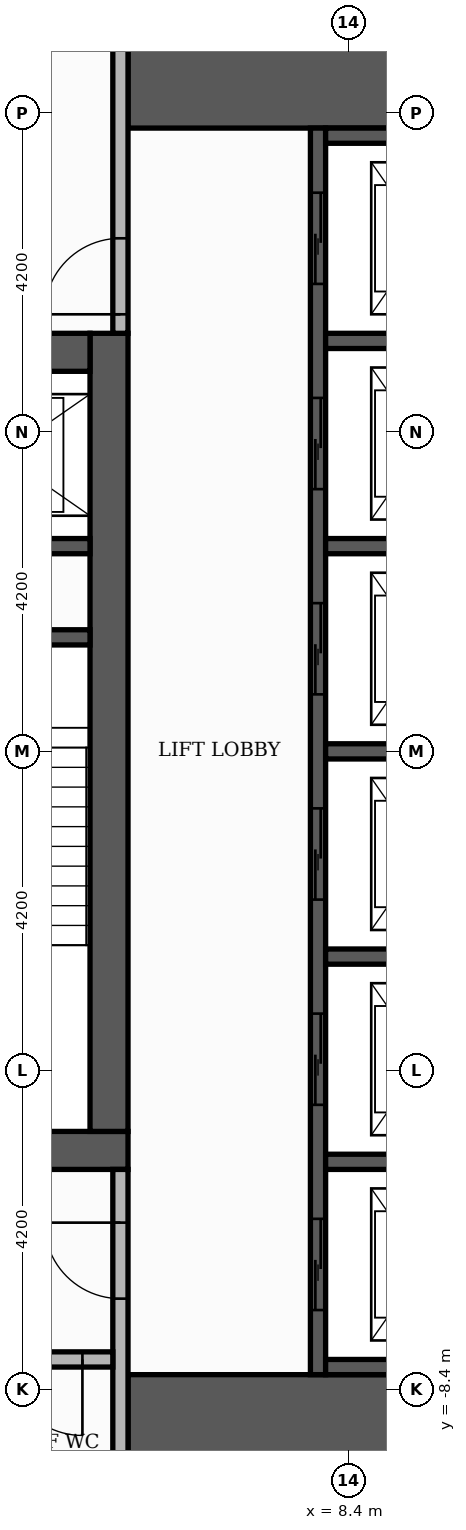
"""IFC4 building model, lengths in metres.
Left out: names, types, materials, properties, quantities, classifications, styles, units other than length and angle.
Written with IfcOpenShell. Run it as: python <this file> out.ifc"""

import sys

from ifc_helpers import new_model, si_unit, direction, frame, frame_2d, origin, place, context, subcontext, project, spatial, rectangle, extrude, element, fill, save


model = new_model("IFC4")
c1 = context("Model", 3, precision=1e-05, world=origin(), true_north=direction((0.0, 1.0)))
c2 = subcontext(c1, "Body", "Model", "MODEL_VIEW")
j1 = project(units=[si_unit("LENGTHUNIT", "METRE"), si_unit("PLANEANGLEUNIT", "RADIAN")], contexts=[c1])
p1 = place(None, origin())
s1 = spatial("IfcSite", under=j1, at=p1, CompositionType="ELEMENT")
p2 = place(p1, origin())
s2 = spatial("IfcBuilding", under=s1, at=p2, CompositionType="ELEMENT")
p3 = place(p2, frame((0.0, 0.0, 165.0)))
s3 = spatial("IfcBuildingStorey", under=s2, at=p3, CompositionType="ELEMENT", Elevation=165.0)
p4 = place(p3, frame((-5.5, -5.25, 0.0), z_axis=(0.0, 0.0, 1.0), x_axis=(1.0, 0.0, 0.0)))
e1 = element("IfcWall", 1, at=p4, inside=s3, PredefinedType="SHEAR", context=c2, shape_type="SweptSolid", body=[
    extrude(rectangle(XDim=11.0, YDim=0.5, at=frame_2d((5.5, 0.0))), origin(), (0.0, 0.0, 1.0), 3.48),
])
p5 = place(p4, frame((4.9, 0.0, 0.0)))
e2 = element("IfcOpeningElement", 2, at=p5, cuts=e1, PredefinedType="OPENING", context=c2, shape_type="SweptSolid", body=[
    extrude(rectangle(XDim=1.2, YDim=2.1, at=frame_2d((0.6, 1.05))), frame((0.0, 0.26, 0.0), z_axis=(0.0, -1.0, 0.0), x_axis=(1.0, 0.0, 0.0)), (0.0, 0.0, 1.0), 0.52),
])
p6 = place(p3, frame((5.25, -5.0, 0.0), z_axis=(0.0, 0.0, 1.0), x_axis=(0.0, 1.0, 0.0)))
e3 = element("IfcWall", 3, at=p6, inside=s3, PredefinedType="SHEAR", context=c2, shape_type="SweptSolid", body=[
    extrude(rectangle(XDim=10.5, YDim=0.5, at=frame_2d((5.25, 0.0))), origin(), (0.0, 0.0, 1.0), 3.48),
])
p7 = place(p3, frame((-5.0, 5.25, 0.0), z_axis=(0.0, 0.0, 1.0), x_axis=(1.0, 0.0, 0.0)))
e4 = element("IfcWall", 4, at=p7, inside=s3, PredefinedType="SHEAR", context=c2, shape_type="SweptSolid", body=[
    extrude(rectangle(XDim=10.0, YDim=0.5, at=frame_2d((5.0, 0.0))), origin(), (0.0, 0.0, 1.0), 3.48),
])
p8 = place(p7, frame((4.4, 0.0, 0.0)))
e5 = element("IfcOpeningElement", 5, at=p8, cuts=e4, PredefinedType="OPENING", context=c2, shape_type="SweptSolid", body=[
    extrude(rectangle(XDim=1.2, YDim=2.1, at=frame_2d((0.6, 1.05))), frame((0.0, 0.26, 0.0), z_axis=(0.0, -1.0, 0.0), x_axis=(1.0, 0.0, 0.0)), (0.0, 0.0, 1.0), 0.52),
])
for number, where, z_axis, x_axis in (
    (6, (5.5, -9.15, 0.0), (0.0, 0.0, 1.0), (1.0, 0.0, 0.0)),
    (7, (5.5, 9.15, 0.0), (0.0, 0.0, 1.0), (1.0, 0.0, 0.0)),
):
    element("IfcWall", number, at=place(p3, frame(where, z_axis=z_axis, x_axis=x_axis)), inside=s3, PredefinedType="SHEAR", context=c2, shape_type="SweptSolid", body=[
        extrude(rectangle(XDim=4.6, YDim=1.9, at=frame_2d((2.3, 0.0))), origin(), (0.0, 0.0, 1.0), 3.48),
    ])
p9 = place(p3, frame((2.15, 1.5, 0.0), z_axis=(0.0, 0.0, 1.0), x_axis=(1.0, 0.0, 0.0)))
e8 = element("IfcWall", 8, at=p9, inside=s3, PredefinedType="SHEAR", context=c2, shape_type="SweptSolid", body=[
    extrude(rectangle(XDim=2.85, YDim=0.2, at=frame_2d((1.425, 0.0))), origin(), (0.0, 0.0, 1.0), 3.48),
])
p10 = place(p3, frame((8.0, -8.2, 0.0), z_axis=(0.0, 0.0, 1.0), x_axis=(0.0, 1.0, 0.0)))
e9 = element("IfcWall", 9, at=p10, inside=s3, PredefinedType="SHEAR", context=c2, shape_type="SweptSolid", body=[
    extrude(rectangle(XDim=16.4, YDim=0.2, at=frame_2d((8.2, 0.0))), origin(), (0.0, 0.0, 1.0), 3.48),
])
p11 = place(p10, frame((0.85, 0.0, 0.0)))
e10 = element("IfcOpeningElement", 10, at=p11, cuts=e9, PredefinedType="OPENING", context=c2, shape_type="SweptSolid", body=[
    extrude(rectangle(XDim=1.2, YDim=2.1, at=frame_2d((0.6, 1.05))), frame((0.0, 0.11, 0.0), z_axis=(0.0, -1.0, 0.0), x_axis=(1.0, 0.0, 0.0)), (0.0, 0.0, 1.0), 0.22),
])
p12 = place(p10, frame((3.55, 0.0, 0.0)))
e11 = element("IfcOpeningElement", 11, at=p12, cuts=e9, PredefinedType="OPENING", context=c2, shape_type="SweptSolid", body=[
    extrude(rectangle(XDim=1.2, YDim=2.1, at=frame_2d((0.6, 1.05))), frame((0.0, 0.11, 0.0), z_axis=(0.0, -1.0, 0.0), x_axis=(1.0, 0.0, 0.0)), (0.0, 0.0, 1.0), 0.22),
])
p13 = place(p10, frame((6.25, 0.0, 0.0)))
e12 = element("IfcOpeningElement", 12, at=p13, cuts=e9, PredefinedType="OPENING", context=c2, shape_type="SweptSolid", body=[
    extrude(rectangle(XDim=1.2, YDim=2.1, at=frame_2d((0.6, 1.05))), frame((0.0, 0.11, 0.0), z_axis=(0.0, -1.0, 0.0), x_axis=(1.0, 0.0, 0.0)), (0.0, 0.0, 1.0), 0.22),
])
p14 = place(p10, frame((8.95, 0.0, 0.0)))
e13 = element("IfcOpeningElement", 13, at=p14, cuts=e9, PredefinedType="OPENING", context=c2, shape_type="SweptSolid", body=[
    extrude(rectangle(XDim=1.2, YDim=2.1, at=frame_2d((0.6, 1.05))), frame((0.0, 0.11, 0.0), z_axis=(0.0, -1.0, 0.0), x_axis=(1.0, 0.0, 0.0)), (0.0, 0.0, 1.0), 0.22),
])
p15 = place(p10, frame((11.65, 0.0, 0.0)))
e14 = element("IfcOpeningElement", 14, at=p15, cuts=e9, PredefinedType="OPENING", context=c2, shape_type="SweptSolid", body=[
    extrude(rectangle(XDim=1.2, YDim=2.1, at=frame_2d((0.6, 1.05))), frame((0.0, 0.11, 0.0), z_axis=(0.0, -1.0, 0.0), x_axis=(1.0, 0.0, 0.0)), (0.0, 0.0, 1.0), 0.22),
])
p16 = place(p10, frame((14.35, 0.0, 0.0)))
e15 = element("IfcOpeningElement", 15, at=p16, cuts=e9, PredefinedType="OPENING", context=c2, shape_type="SweptSolid", body=[
    extrude(rectangle(XDim=1.2, YDim=2.1, at=frame_2d((0.6, 1.05))), frame((0.0, 0.11, 0.0), z_axis=(0.0, -1.0, 0.0), x_axis=(1.0, 0.0, 0.0)), (0.0, 0.0, 1.0), 0.22),
])
for number, where, z_axis, x_axis in (
    (16, (8.1, -8.1, 0.0), (0.0, 0.0, 1.0), (1.0, 0.0, 0.0)),
    (17, (8.1, -5.4, 0.0), (0.0, 0.0, 1.0), (1.0, 0.0, 0.0)),
    (18, (8.1, -2.7, 0.0), (0.0, 0.0, 1.0), (1.0, 0.0, 0.0)),
    (19, (8.1, 0.0, 0.0), (0.0, 0.0, 1.0), (1.0, 0.0, 0.0)),
):
    element("IfcWall", number, at=place(p3, frame(where, z_axis=z_axis, x_axis=x_axis)), inside=s3, PredefinedType="SHEAR", context=c2, shape_type="SweptSolid", body=[
        extrude(rectangle(XDim=2.0, YDim=0.2, at=frame_2d((1.0, 0.0))), origin(), (0.0, 0.0, 1.0), 3.48),
    ])
p17 = place(p3, frame((2.15, 2.7, 0.0), z_axis=(0.0, 0.0, 1.0), x_axis=(1.0, 0.0, 0.0)))
e20 = element("IfcWall", 20, at=p17, inside=s3, PredefinedType="SHEAR", context=c2, shape_type="SweptSolid", body=[
    extrude(rectangle(XDim=2.85, YDim=0.2, at=frame_2d((1.425, 0.0))), origin(), (0.0, 0.0, 1.0), 3.48),
])
for number, where, z_axis, x_axis in (
    (21, (8.1, 2.7, 0.0), (0.0, 0.0, 1.0), (1.0, 0.0, 0.0)),
    (22, (8.1, 5.4, 0.0), (0.0, 0.0, 1.0), (1.0, 0.0, 0.0)),
    (23, (8.1, 8.1, 0.0), (0.0, 0.0, 1.0), (1.0, 0.0, 0.0)),
):
    element("IfcWall", number, at=place(p3, frame(where, z_axis=z_axis, x_axis=x_axis)), inside=s3, PredefinedType="SHEAR", context=c2, shape_type="SweptSolid", body=[
        extrude(rectangle(XDim=2.0, YDim=0.2, at=frame_2d((1.0, 0.0))), origin(), (0.0, 0.0, 1.0), 3.48),
    ])
p18 = place(p3, frame((5.4, -10.1, 0.0), z_axis=(0.0, 0.0, 1.0), x_axis=(0.0, 1.0, 0.0)))
e24 = element("IfcWall", 24, at=p18, inside=s3, PredefinedType="PARTITIONING", context=c2, shape_type="SweptSolid", body=[
    extrude(rectangle(XDim=4.6, YDim=0.2, at=frame_2d((2.3, 0.0))), origin(), (0.0, 0.0, 1.0), 3.48),
])
p19 = place(p18, frame((2.9, 0.0, 0.0)))
e25 = element("IfcOpeningElement", 25, at=p19, cuts=e24, PredefinedType="OPENING", context=c2, shape_type="SweptSolid", body=[
    extrude(rectangle(XDim=1.0, YDim=2.1, at=frame_2d((0.5, 1.05))), frame((0.0, 0.11, 0.0), z_axis=(0.0, -1.0, 0.0), x_axis=(1.0, 0.0, 0.0)), (0.0, 0.0, 1.0), 0.22),
])
p20 = place(p3, frame((3.55, -8.0, 0.0), z_axis=(0.0, 0.0, 1.0), x_axis=(1.0, 0.0, 0.0)))
e26 = element("IfcWall", 26, at=p20, inside=s3, PredefinedType="PARTITIONING", context=c2, shape_type="SweptSolid", body=[
    extrude(rectangle(XDim=1.75, YDim=0.2, at=frame_2d((0.875, 0.0))), origin(), (0.0, 0.0, 1.0), 3.48),
])
p21 = place(p20, frame((0.35, 0.0, 0.0)))
e27 = element("IfcOpeningElement", 27, at=p21, cuts=e26, PredefinedType="OPENING", context=c2, shape_type="SweptSolid", body=[
    extrude(rectangle(XDim=1.0, YDim=2.1, at=frame_2d((0.5, 1.05))), frame((0.0, 0.11, 0.0), z_axis=(0.0, -1.0, 0.0), x_axis=(1.0, 0.0, 0.0)), (0.0, 0.0, 1.0), 0.22),
])
p22 = place(p3, frame((5.4, 5.5, 0.0), z_axis=(0.0, 0.0, 1.0), x_axis=(0.0, 1.0, 0.0)))
e28 = element("IfcWall", 28, at=p22, inside=s3, PredefinedType="PARTITIONING", context=c2, shape_type="SweptSolid", body=[
    extrude(rectangle(XDim=4.6, YDim=0.2, at=frame_2d((2.3, 0.0))), origin(), (0.0, 0.0, 1.0), 3.48),
])
p23 = place(p22, frame((0.25, 0.0, 0.0)))
e29 = element("IfcOpeningElement", 29, at=p23, cuts=e28, PredefinedType="OPENING", context=c2, shape_type="SweptSolid", body=[
    extrude(rectangle(XDim=1.0, YDim=2.1, at=frame_2d((0.5, 1.05))), frame((0.0, 0.11, 0.0), z_axis=(0.0, -1.0, 0.0), x_axis=(1.0, 0.0, 0.0)), (0.0, 0.0, 1.0), 0.22),
])
p24 = place(p11, origin())
e30 = element("IfcDoor", 30, at=p24, inside=s3, OperationType="SLIDING_TO_LEFT", PredefinedType="DOOR", context=c2, shape_type="SweptSolid", body=[
    extrude(rectangle(XDim=1.2, YDim=2.1, at=frame_2d((0.6, 1.05))), frame((0.0, 0.025, 0.0), z_axis=(0.0, -1.0, 0.0), x_axis=(1.0, 0.0, 0.0)), (0.0, 0.0, 1.0), 0.05),
])
fill(e10, e30)
p25 = place(p12, origin())
e31 = element("IfcDoor", 31, at=p25, inside=s3, OperationType="SLIDING_TO_LEFT", PredefinedType="DOOR", context=c2, shape_type="SweptSolid", body=[
    extrude(rectangle(XDim=1.2, YDim=2.1, at=frame_2d((0.6, 1.05))), frame((0.0, 0.025, 0.0), z_axis=(0.0, -1.0, 0.0), x_axis=(1.0, 0.0, 0.0)), (0.0, 0.0, 1.0), 0.05),
])
fill(e11, e31)
p26 = place(p13, origin())
e32 = element("IfcDoor", 32, at=p26, inside=s3, OperationType="SLIDING_TO_LEFT", PredefinedType="DOOR", context=c2, shape_type="SweptSolid", body=[
    extrude(rectangle(XDim=1.2, YDim=2.1, at=frame_2d((0.6, 1.05))), frame((0.0, 0.025, 0.0), z_axis=(0.0, -1.0, 0.0), x_axis=(1.0, 0.0, 0.0)), (0.0, 0.0, 1.0), 0.05),
])
fill(e12, e32)
p27 = place(p14, origin())
e33 = element("IfcDoor", 33, at=p27, inside=s3, OperationType="SLIDING_TO_LEFT", PredefinedType="DOOR", context=c2, shape_type="SweptSolid", body=[
    extrude(rectangle(XDim=1.2, YDim=2.1, at=frame_2d((0.6, 1.05))), frame((0.0, 0.025, 0.0), z_axis=(0.0, -1.0, 0.0), x_axis=(1.0, 0.0, 0.0)), (0.0, 0.0, 1.0), 0.05),
])
fill(e13, e33)
p28 = place(p15, origin())
e34 = element("IfcDoor", 34, at=p28, inside=s3, OperationType="SLIDING_TO_LEFT", PredefinedType="DOOR", context=c2, shape_type="SweptSolid", body=[
    extrude(rectangle(XDim=1.2, YDim=2.1, at=frame_2d((0.6, 1.05))), frame((0.0, 0.025, 0.0), z_axis=(0.0, -1.0, 0.0), x_axis=(1.0, 0.0, 0.0)), (0.0, 0.0, 1.0), 0.05),
])
fill(e14, e34)
p29 = place(p16, origin())
e35 = element("IfcDoor", 35, at=p29, inside=s3, OperationType="SLIDING_TO_LEFT", PredefinedType="DOOR", context=c2, shape_type="SweptSolid", body=[
    extrude(rectangle(XDim=1.2, YDim=2.1, at=frame_2d((0.6, 1.05))), frame((0.0, 0.025, 0.0), z_axis=(0.0, -1.0, 0.0), x_axis=(1.0, 0.0, 0.0)), (0.0, 0.0, 1.0), 0.05),
])
fill(e15, e35)
p30 = place(p23, origin())
e36 = element("IfcDoor", 36, at=p30, inside=s3, OperationType="SINGLE_SWING_LEFT", PredefinedType="DOOR", context=c2, shape_type="SweptSolid", body=[
    extrude(rectangle(XDim=1.0, YDim=2.1, at=frame_2d((0.5, 1.05))), frame((0.0, 0.025, 0.0), z_axis=(0.0, -1.0, 0.0), x_axis=(1.0, 0.0, 0.0)), (0.0, 0.0, 1.0), 0.05),
])
fill(e29, e36)
p31 = place(p19, origin())
e37 = element("IfcDoor", 37, at=p31, inside=s3, OperationType="SINGLE_SWING_RIGHT", PredefinedType="DOOR", context=c2, shape_type="SweptSolid", body=[
    extrude(rectangle(XDim=1.0, YDim=2.1, at=frame_2d((0.5, 1.05))), frame((0.0, 0.025, 0.0), z_axis=(0.0, -1.0, 0.0), x_axis=(1.0, 0.0, 0.0)), (0.0, 0.0, 1.0), 0.05),
])
fill(e25, e37)
p32 = place(p21, frame((1.0, 0.0, 0.0), z_axis=(0.0, 0.0, 1.0), x_axis=(-1.0, 0.0, 0.0)))
e38 = element("IfcDoor", 38, at=p32, inside=s3, OperationType="SINGLE_SWING_RIGHT", PredefinedType="DOOR", context=c2, shape_type="SweptSolid", body=[
    extrude(rectangle(XDim=1.0, YDim=2.1, at=frame_2d((0.5, 1.05))), frame((0.0, 0.025, 0.0), z_axis=(0.0, -1.0, 0.0), x_axis=(1.0, 0.0, 0.0)), (0.0, 0.0, 1.0), 0.05),
])
fill(e27, e38)
save(model, sys.argv[1])
